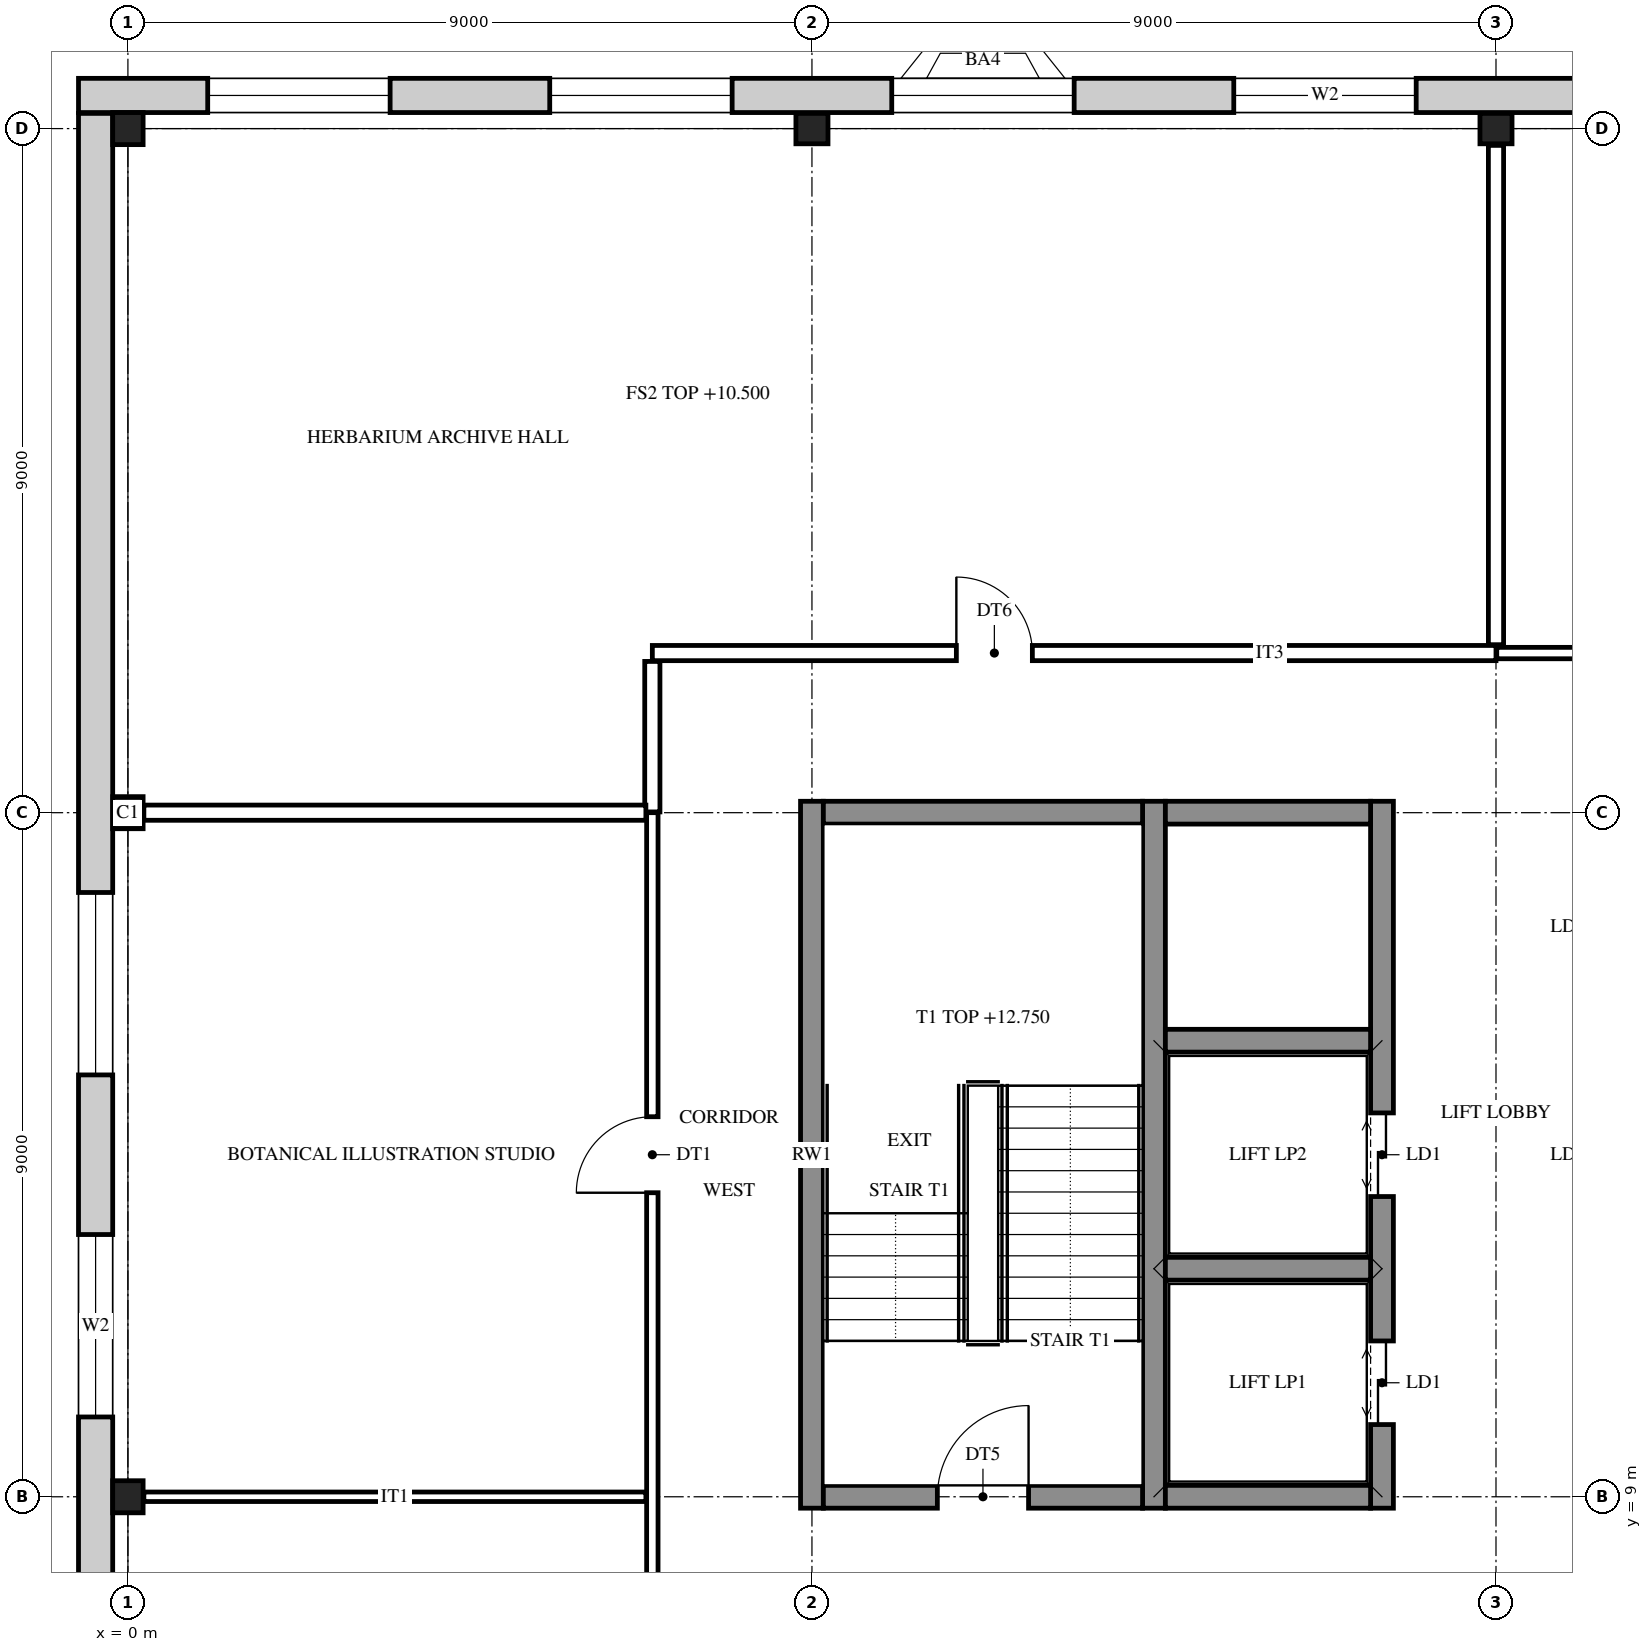
"""IFC4 building model, lengths in metres.
Left out: names, types, materials, properties, quantities, classifications, styles, units other than length and angle.
Written with IfcOpenShell. Run it as: python <this file> out.ifc"""

import sys

from ifc_helpers import new_model, si_unit, direction, frame, frame_2d, origin, origin_2d, place, context, subcontext, project, spatial, rectangle, i_section, extrude, element, fill, save


model = new_model("IFC4")
c1 = context("Model", 3, precision=1e-05, world=origin(), true_north=direction((0.0, 1.0)))
c2 = subcontext(c1, "Body", "Model", "MODEL_VIEW")
j1 = project(units=[si_unit("LENGTHUNIT", "METRE"), si_unit("PLANEANGLEUNIT", "RADIAN")], contexts=[c1])
p1 = place(None, origin())
s1 = spatial("IfcSite", under=j1, at=p1, CompositionType="ELEMENT")
p2 = place(p1, origin())
s2 = spatial("IfcBuilding", under=s1, at=p2, CompositionType="ELEMENT")
p3 = place(p2, frame((0.0, 0.0, 10.5)))
s3 = spatial("IfcBuildingStorey", under=s2, at=p3, CompositionType="ELEMENT", Elevation=10.5)
for number, where, z_axis, x_axis in (
    (1, (0.0, 9.0, 0.0), (0.0, 0.0, 1.0), (1.0, 0.0, 0.0)),
    (2, (0.0, 18.0, 0.0), (0.0, 0.0, 1.0), (1.0, 0.0, 0.0)),
    (3, (0.0, 27.0, 0.0), (0.0, 0.0, 1.0), (1.0, 0.0, 0.0)),
    (4, (9.0, 27.0, 0.0), (0.0, 0.0, 1.0), (0.0, 1.0, 0.0)),
    (5, (18.0, 27.0, 0.0), (0.0, 0.0, 1.0), (0.0, 1.0, 0.0)),
):
    element("IfcColumn", number, at=place(p3, frame(where, z_axis=z_axis, x_axis=x_axis)), inside=s3, PredefinedType="COLUMN", context=c2, shape_type="SweptSolid", body=[
        extrude(i_section(OverallWidth=0.4, OverallDepth=0.422, WebThickness=0.028, FlangeThickness=0.036, at=origin_2d()), origin(), (0.0, 0.0, 1.0), 4.5),
    ])
for number, where, z_axis, x_axis in (
    (6, (9.0, 8.85, 0.0), (0.0, 0.0, 1.0), (0.0, 1.0, 0.0)),
    (7, (13.5, 8.85, 0.0), (0.0, 0.0, 1.0), (0.0, 1.0, 0.0)),
):
    element("IfcWall", number, at=place(p3, frame(where, z_axis=z_axis, x_axis=x_axis)), inside=s3, PredefinedType="SHEAR", context=c2, shape_type="SweptSolid", body=[
        extrude(rectangle(XDim=9.3, YDim=0.3, at=frame_2d((4.65, 0.0))), origin(), (0.0, 0.0, 1.0), 4.5),
    ])
p4 = place(p3, frame((16.5, 8.85, 0.0), z_axis=(0.0, 0.0, 1.0), x_axis=(0.0, 1.0, 0.0)))
e8 = element("IfcWall", 8, at=p4, inside=s3, PredefinedType="SHEAR", context=c2, shape_type="SweptSolid", body=[
    extrude(rectangle(XDim=9.3, YDim=0.3, at=frame_2d((4.65, 0.0))), origin(), (0.0, 0.0, 1.0), 4.5),
])
p5 = place(p4, frame((1.1, 0.0, 0.0)))
e9 = element("IfcOpeningElement", 9, at=p5, cuts=e8, PredefinedType="OPENING", context=c2, shape_type="SweptSolid", body=[
    extrude(rectangle(XDim=1.1, YDim=2.1, at=frame_2d((0.55, 1.05))), frame((0.0, 0.16, 0.0), z_axis=(0.0, -1.0, 0.0), x_axis=(1.0, 0.0, 0.0)), (0.0, 0.0, 1.0), 0.32),
])
p6 = place(p4, frame((4.1, 0.0, 0.0)))
e10 = element("IfcOpeningElement", 10, at=p6, cuts=e8, PredefinedType="OPENING", context=c2, shape_type="SweptSolid", body=[
    extrude(rectangle(XDim=1.1, YDim=2.1, at=frame_2d((0.55, 1.05))), frame((0.0, 0.16, 0.0), z_axis=(0.0, -1.0, 0.0), x_axis=(1.0, 0.0, 0.0)), (0.0, 0.0, 1.0), 0.32),
])
p7 = place(p3, frame((9.15, 9.0, 0.0), z_axis=(0.0, 0.0, 1.0), x_axis=(1.0, 0.0, 0.0)))
e11 = element("IfcWall", 11, at=p7, inside=s3, PredefinedType="SHEAR", context=c2, shape_type="SweptSolid", body=[
    extrude(rectangle(XDim=4.2, YDim=0.3, at=frame_2d((2.1, 0.0))), origin(), (0.0, 0.0, 1.0), 4.5),
])
p8 = place(p7, frame((1.5, 0.0, 0.0)))
e12 = element("IfcOpeningElement", 12, at=p8, cuts=e11, PredefinedType="OPENING", context=c2, shape_type="SweptSolid", body=[
    extrude(rectangle(XDim=1.2, YDim=2.1, at=frame_2d((0.6, 1.05))), frame((0.0, 0.16, 0.0), z_axis=(0.0, -1.0, 0.0), x_axis=(1.0, 0.0, 0.0)), (0.0, 0.0, 1.0), 0.32),
])
for number, where, z_axis, x_axis in (
    (13, (13.65, 9.0, 0.0), (0.0, 0.0, 1.0), (1.0, 0.0, 0.0)),
    (14, (13.65, 12.0, 0.0), (0.0, 0.0, 1.0), (1.0, 0.0, 0.0)),
    (15, (13.65, 15.0, 0.0), (0.0, 0.0, 1.0), (1.0, 0.0, 0.0)),
):
    element("IfcWall", number, at=place(p3, frame(where, z_axis=z_axis, x_axis=x_axis)), inside=s3, PredefinedType="SHEAR", context=c2, shape_type="SweptSolid", body=[
        extrude(rectangle(XDim=2.7, YDim=0.3, at=frame_2d((1.35, 0.0))), origin(), (0.0, 0.0, 1.0), 4.5),
    ])
p9 = place(p3, frame((9.15, 18.0, 0.0), z_axis=(0.0, 0.0, 1.0), x_axis=(1.0, 0.0, 0.0)))
e16 = element("IfcWall", 16, at=p9, inside=s3, PredefinedType="SHEAR", context=c2, shape_type="SweptSolid", body=[
    extrude(rectangle(XDim=4.2, YDim=0.3, at=frame_2d((2.1, 0.0))), origin(), (0.0, 0.0, 1.0), 4.5),
])
p10 = place(p3, frame((13.65, 18.0, 0.0), z_axis=(0.0, 0.0, 1.0), x_axis=(1.0, 0.0, 0.0)))
e17 = element("IfcWall", 17, at=p10, inside=s3, PredefinedType="SHEAR", context=c2, shape_type="SweptSolid", body=[
    extrude(rectangle(XDim=2.7, YDim=0.3, at=frame_2d((1.35, 0.0))), origin(), (0.0, 0.0, 1.0), 4.5),
])
p11 = place(p3, frame((-0.425, -0.2, 0.0), z_axis=(0.0, 0.0, 1.0), x_axis=(0.0, 1.0, 0.0)))
e18 = element("IfcWall", 18, at=p11, inside=s3, PredefinedType="STANDARD", context=c2, shape_type="SweptSolid", body=[
    extrude(rectangle(XDim=27.4, YDim=0.45, at=frame_2d((13.7, 0.0))), origin(), (0.0, 0.0, 1.0), 4.5),
])
p12 = place(p11, frame((10.25, 0.0, 0.9)))
e19 = element("IfcOpeningElement", 19, at=p12, cuts=e18, PredefinedType="OPENING", context=c2, shape_type="SweptSolid", body=[
    extrude(rectangle(XDim=2.4, YDim=2.8, at=frame_2d((1.2, 1.4))), frame((0.0, 0.235, 0.0), z_axis=(0.0, -1.0, 0.0), x_axis=(1.0, 0.0, 0.0)), (0.0, 0.0, 1.0), 0.47),
])
p13 = place(p11, frame((14.75, 0.0, 0.9)))
e20 = element("IfcOpeningElement", 20, at=p13, cuts=e18, PredefinedType="OPENING", context=c2, shape_type="SweptSolid", body=[
    extrude(rectangle(XDim=2.4, YDim=2.8, at=frame_2d((1.2, 1.4))), frame((0.0, 0.235, 0.0), z_axis=(0.0, -1.0, 0.0), x_axis=(1.0, 0.0, 0.0)), (0.0, 0.0, 1.0), 0.47),
])
p14 = place(p3, frame((-0.65, 27.436, 0.0), z_axis=(0.0, 0.0, 1.0), x_axis=(1.0, 0.0, 0.0)))
e21 = element("IfcWall", 21, at=p14, inside=s3, PredefinedType="STANDARD", context=c2, shape_type="SweptSolid", body=[
    extrude(rectangle(XDim=32.8, YDim=0.45, at=frame_2d((16.4, 0.0))), origin(), (0.0, 0.0, 1.0), 4.5),
])
p15 = place(p14, frame((1.7, 0.0, 0.9)))
e22 = element("IfcOpeningElement", 22, at=p15, cuts=e21, PredefinedType="OPENING", context=c2, shape_type="SweptSolid", body=[
    extrude(rectangle(XDim=2.4, YDim=2.8, at=frame_2d((1.2, 1.4))), frame((0.0, 0.235, 0.0), z_axis=(0.0, -1.0, 0.0), x_axis=(1.0, 0.0, 0.0)), (0.0, 0.0, 1.0), 0.47),
])
p16 = place(p14, frame((6.2, 0.0, 0.9)))
e23 = element("IfcOpeningElement", 23, at=p16, cuts=e21, PredefinedType="OPENING", context=c2, shape_type="SweptSolid", body=[
    extrude(rectangle(XDim=2.4, YDim=2.8, at=frame_2d((1.2, 1.4))), frame((0.0, 0.235, 0.0), z_axis=(0.0, -1.0, 0.0), x_axis=(1.0, 0.0, 0.0)), (0.0, 0.0, 1.0), 0.47),
])
p17 = place(p14, frame((10.7, 0.0, 0.9)))
e24 = element("IfcOpeningElement", 24, at=p17, cuts=e21, PredefinedType="OPENING", context=c2, shape_type="SweptSolid", body=[
    extrude(rectangle(XDim=2.4, YDim=2.8, at=frame_2d((1.2, 1.4))), frame((0.0, 0.235, 0.0), z_axis=(0.0, -1.0, 0.0), x_axis=(1.0, 0.0, 0.0)), (0.0, 0.0, 1.0), 0.47),
])
p18 = place(p14, frame((15.2, 0.0, 0.9)))
e25 = element("IfcOpeningElement", 25, at=p18, cuts=e21, PredefinedType="OPENING", context=c2, shape_type="SweptSolid", body=[
    extrude(rectangle(XDim=2.4, YDim=2.8, at=frame_2d((1.2, 1.4))), frame((0.0, 0.235, 0.0), z_axis=(0.0, -1.0, 0.0), x_axis=(1.0, 0.0, 0.0)), (0.0, 0.0, 1.0), 0.47),
])
p19 = place(p14, frame((19.7, 0.0, 0.9)))
e26 = element("IfcOpeningElement", 26, at=p19, cuts=e21, PredefinedType="OPENING", context=c2, shape_type="SweptSolid", body=[
    extrude(rectangle(XDim=2.4, YDim=2.8, at=frame_2d((1.2, 1.4))), frame((0.0, 0.235, 0.0), z_axis=(0.0, -1.0, 0.0), x_axis=(1.0, 0.0, 0.0)), (0.0, 0.0, 1.0), 0.47),
])
p20 = place(p14, frame((24.2, 0.0, 0.9)))
e27 = element("IfcOpeningElement", 27, at=p20, cuts=e21, PredefinedType="OPENING", context=c2, shape_type="SweptSolid", body=[
    extrude(rectangle(XDim=2.4, YDim=2.8, at=frame_2d((1.2, 1.4))), frame((0.0, 0.235, 0.0), z_axis=(0.0, -1.0, 0.0), x_axis=(1.0, 0.0, 0.0)), (0.0, 0.0, 1.0), 0.47),
])
p21 = place(p14, frame((28.7, 0.0, 0.9)))
e28 = element("IfcOpeningElement", 28, at=p21, cuts=e21, PredefinedType="OPENING", context=c2, shape_type="SweptSolid", body=[
    extrude(rectangle(XDim=2.4, YDim=2.8, at=frame_2d((1.2, 1.4))), frame((0.0, 0.235, 0.0), z_axis=(0.0, -1.0, 0.0), x_axis=(1.0, 0.0, 0.0)), (0.0, 0.0, 1.0), 0.47),
])
p22 = place(p3, frame((6.9, 6.985, 0.0), z_axis=(0.0, 0.0, 1.0), x_axis=(0.0, 1.0, 0.0)))
e29 = element("IfcWall", 29, at=p22, inside=s3, PredefinedType="PARTITIONING", context=c2, shape_type="SweptSolid", body=[
    extrude(rectangle(XDim=11.015, YDim=0.15, at=frame_2d((5.507, 0.0))), origin(), (0.0, 0.0, 1.0), 3.822),
])
p23 = place(p22, frame((6.015, 0.0, 0.0)))
e30 = element("IfcOpeningElement", 30, at=p23, cuts=e29, PredefinedType="OPENING", context=c2, shape_type="SweptSolid", body=[
    extrude(rectangle(XDim=1.0, YDim=2.1, at=frame_2d((0.5, 1.05))), frame((0.0, 0.085, 0.0), z_axis=(0.0, -1.0, 0.0), x_axis=(1.0, 0.0, 0.0)), (0.0, 0.0, 1.0), 0.17),
])
p24 = place(p3, frame((6.9, 18.01, 0.0), z_axis=(0.0, 0.0, 1.0), x_axis=(0.0, 1.0, 0.0)))
e31 = element("IfcWall", 31, at=p24, inside=s3, PredefinedType="PARTITIONING", context=c2, shape_type="SweptSolid", body=[
    extrude(rectangle(XDim=1.98, YDim=0.2, at=frame_2d((0.99, 0.0))), origin(), (0.0, 0.0, 1.0), 3.822),
])
p25 = place(p3, frame((18.0, 20.21, 0.0), z_axis=(0.0, 0.0, 1.0), x_axis=(0.0, 1.0, 0.0)))
e32 = element("IfcWall", 32, at=p25, inside=s3, PredefinedType="PARTITIONING", context=c2, shape_type="SweptSolid", body=[
    extrude(rectangle(XDim=6.569, YDim=0.2, at=frame_2d((3.285, 0.0))), origin(), (0.0, 0.0, 1.0), 3.822),
])
p26 = place(p3, frame((0.21, 9.0, 0.0), z_axis=(0.0, 0.0, 1.0), x_axis=(1.0, 0.0, 0.0)))
e33 = element("IfcWall", 33, at=p26, inside=s3, PredefinedType="PARTITIONING", context=c2, shape_type="SweptSolid", body=[
    extrude(rectangle(XDim=6.605, YDim=0.125, at=frame_2d((3.302, 0.0))), origin(), (0.0, 0.0, 1.0), 3.822),
])
p27 = place(p3, frame((0.21, 18.0, 0.0), z_axis=(0.0, 0.0, 1.0), x_axis=(1.0, 0.0, 0.0)))
e34 = element("IfcWall", 34, at=p27, inside=s3, PredefinedType="PARTITIONING", context=c2, shape_type="SweptSolid", body=[
    extrude(rectangle(XDim=6.605, YDim=0.2, at=frame_2d((3.302, 0.0))), origin(), (0.0, 0.0, 1.0), 3.822),
])
p28 = place(p3, frame((6.9, 20.1, 0.0), z_axis=(0.0, 0.0, 1.0), x_axis=(1.0, 0.0, 0.0)))
e35 = element("IfcWall", 35, at=p28, inside=s3, PredefinedType="PARTITIONING", context=c2, shape_type="SweptSolid", body=[
    extrude(rectangle(XDim=11.1, YDim=0.2, at=frame_2d((5.55, 0.0))), origin(), (0.0, 0.0, 1.0), 3.822),
])
p29 = place(p28, frame((4.0, 0.0, 0.0)))
e36 = element("IfcOpeningElement", 36, at=p29, cuts=e35, PredefinedType="OPENING", context=c2, shape_type="SweptSolid", body=[
    extrude(rectangle(XDim=1.0, YDim=2.1, at=frame_2d((0.5, 1.05))), frame((0.0, 0.11, 0.0), z_axis=(0.0, -1.0, 0.0), x_axis=(1.0, 0.0, 0.0)), (0.0, 0.0, 1.0), 0.22),
])
p30 = place(p3, frame((18.01, 20.1, 0.0), z_axis=(0.0, 0.0, 1.0), x_axis=(1.0, 0.0, 0.0)))
e37 = element("IfcWall", 37, at=p30, inside=s3, PredefinedType="PARTITIONING", context=c2, shape_type="SweptSolid", body=[
    extrude(rectangle(XDim=8.99, YDim=0.15, at=frame_2d((4.495, 0.0))), origin(), (0.0, 0.0, 1.0), 3.822),
])
p31 = place(p30, frame((5.19, 0.0, 0.0)))
e38 = element("IfcOpeningElement", 38, at=p31, cuts=e37, PredefinedType="OPENING", context=c2, shape_type="SweptSolid", body=[
    extrude(rectangle(XDim=1.0, YDim=2.1, at=frame_2d((0.5, 1.05))), frame((0.0, 0.085, 0.0), z_axis=(0.0, -1.0, 0.0), x_axis=(1.0, 0.0, 0.0)), (0.0, 0.0, 1.0), 0.17),
])
p32 = place(p12, origin())
e39 = element("IfcWindow", 39, at=p32, inside=s3, PartitioningType="SINGLE_PANEL", PredefinedType="WINDOW", context=c2, shape_type="SweptSolid", body=[
    extrude(rectangle(XDim=2.4, YDim=2.8, at=frame_2d((1.2, 1.4))), frame((0.0, 0.03, 0.0), z_axis=(0.0, -1.0, 0.0), x_axis=(1.0, 0.0, 0.0)), (0.0, 0.0, 1.0), 0.06),
])
fill(e19, e39)
p33 = place(p13, origin())
e40 = element("IfcWindow", 40, at=p33, inside=s3, PartitioningType="SINGLE_PANEL", PredefinedType="WINDOW", context=c2, shape_type="SweptSolid", body=[
    extrude(rectangle(XDim=2.4, YDim=2.8, at=frame_2d((1.2, 1.4))), frame((0.0, 0.03, 0.0), z_axis=(0.0, -1.0, 0.0), x_axis=(1.0, 0.0, 0.0)), (0.0, 0.0, 1.0), 0.06),
])
fill(e20, e40)
p34 = place(p15, origin())
e41 = element("IfcWindow", 41, at=p34, inside=s3, PartitioningType="SINGLE_PANEL", PredefinedType="WINDOW", context=c2, shape_type="SweptSolid", body=[
    extrude(rectangle(XDim=2.4, YDim=2.8, at=frame_2d((1.2, 1.4))), frame((0.0, 0.03, 0.0), z_axis=(0.0, -1.0, 0.0), x_axis=(1.0, 0.0, 0.0)), (0.0, 0.0, 1.0), 0.06),
])
fill(e22, e41)
p35 = place(p16, origin())
e42 = element("IfcWindow", 42, at=p35, inside=s3, PartitioningType="SINGLE_PANEL", PredefinedType="WINDOW", context=c2, shape_type="SweptSolid", body=[
    extrude(rectangle(XDim=2.4, YDim=2.8, at=frame_2d((1.2, 1.4))), frame((0.0, 0.03, 0.0), z_axis=(0.0, -1.0, 0.0), x_axis=(1.0, 0.0, 0.0)), (0.0, 0.0, 1.0), 0.06),
])
fill(e23, e42)
p36 = place(p17, origin())
e43 = element("IfcWindow", 43, at=p36, inside=s3, PartitioningType="SINGLE_PANEL", PredefinedType="WINDOW", context=c2, shape_type="SweptSolid", body=[
    extrude(rectangle(XDim=2.4, YDim=2.8, at=frame_2d((1.2, 1.4))), frame((0.0, 0.03, 0.0), z_axis=(0.0, -1.0, 0.0), x_axis=(1.0, 0.0, 0.0)), (0.0, 0.0, 1.0), 0.06),
])
fill(e24, e43)
p37 = place(p18, origin())
e44 = element("IfcWindow", 44, at=p37, inside=s3, PartitioningType="SINGLE_PANEL", PredefinedType="WINDOW", context=c2, shape_type="SweptSolid", body=[
    extrude(rectangle(XDim=2.4, YDim=2.8, at=frame_2d((1.2, 1.4))), frame((0.0, 0.03, 0.0), z_axis=(0.0, -1.0, 0.0), x_axis=(1.0, 0.0, 0.0)), (0.0, 0.0, 1.0), 0.06),
])
fill(e25, e44)
p38 = place(p8, origin())
e45 = element("IfcDoor", 45, at=p38, inside=s3, OperationType="SINGLE_SWING_RIGHT", PredefinedType="DOOR", context=c2, shape_type="SweptSolid", body=[
    extrude(rectangle(XDim=1.2, YDim=2.1, at=frame_2d((0.6, 1.05))), frame((0.0, 0.025, 0.0), z_axis=(0.0, -1.0, 0.0), x_axis=(1.0, 0.0, 0.0)), (0.0, 0.0, 1.0), 0.05),
])
fill(e12, e45)
p39 = place(p29, origin())
e46 = element("IfcDoor", 46, at=p39, inside=s3, OperationType="SINGLE_SWING_LEFT", PredefinedType="DOOR", context=c2, shape_type="SweptSolid", body=[
    extrude(rectangle(XDim=1.0, YDim=2.1, at=frame_2d((0.5, 1.05))), frame((0.0, 0.025, 0.0), z_axis=(0.0, -1.0, 0.0), x_axis=(1.0, 0.0, 0.0)), (0.0, 0.0, 1.0), 0.05),
])
fill(e36, e46)
p40 = place(p23, origin())
e47 = element("IfcDoor", 47, at=p40, inside=s3, OperationType="SINGLE_SWING_LEFT", PredefinedType="DOOR", context=c2, shape_type="SweptSolid", body=[
    extrude(rectangle(XDim=1.0, YDim=2.1, at=frame_2d((0.5, 1.05))), frame((0.0, 0.025, 0.0), z_axis=(0.0, -1.0, 0.0), x_axis=(1.0, 0.0, 0.0)), (0.0, 0.0, 1.0), 0.05),
])
fill(e30, e47)
p41 = place(p5, origin())
e48 = element("IfcDoor", 48, at=p41, inside=s3, OperationType="DOUBLE_DOOR_SLIDING", PredefinedType="DOOR", context=c2, shape_type="SweptSolid", body=[
    extrude(rectangle(XDim=1.1, YDim=2.1, at=frame_2d((0.55, 1.05))), frame((0.0, 0.025, 0.0), z_axis=(0.0, -1.0, 0.0), x_axis=(1.0, 0.0, 0.0)), (0.0, 0.0, 1.0), 0.05),
])
fill(e9, e48)
p42 = place(p6, origin())
e49 = element("IfcDoor", 49, at=p42, inside=s3, OperationType="DOUBLE_DOOR_SLIDING", PredefinedType="DOOR", context=c2, shape_type="SweptSolid", body=[
    extrude(rectangle(XDim=1.1, YDim=2.1, at=frame_2d((0.55, 1.05))), frame((0.0, 0.025, 0.0), z_axis=(0.0, -1.0, 0.0), x_axis=(1.0, 0.0, 0.0)), (0.0, 0.0, 1.0), 0.05),
])
fill(e10, e49)
save(model, sys.argv[1])
